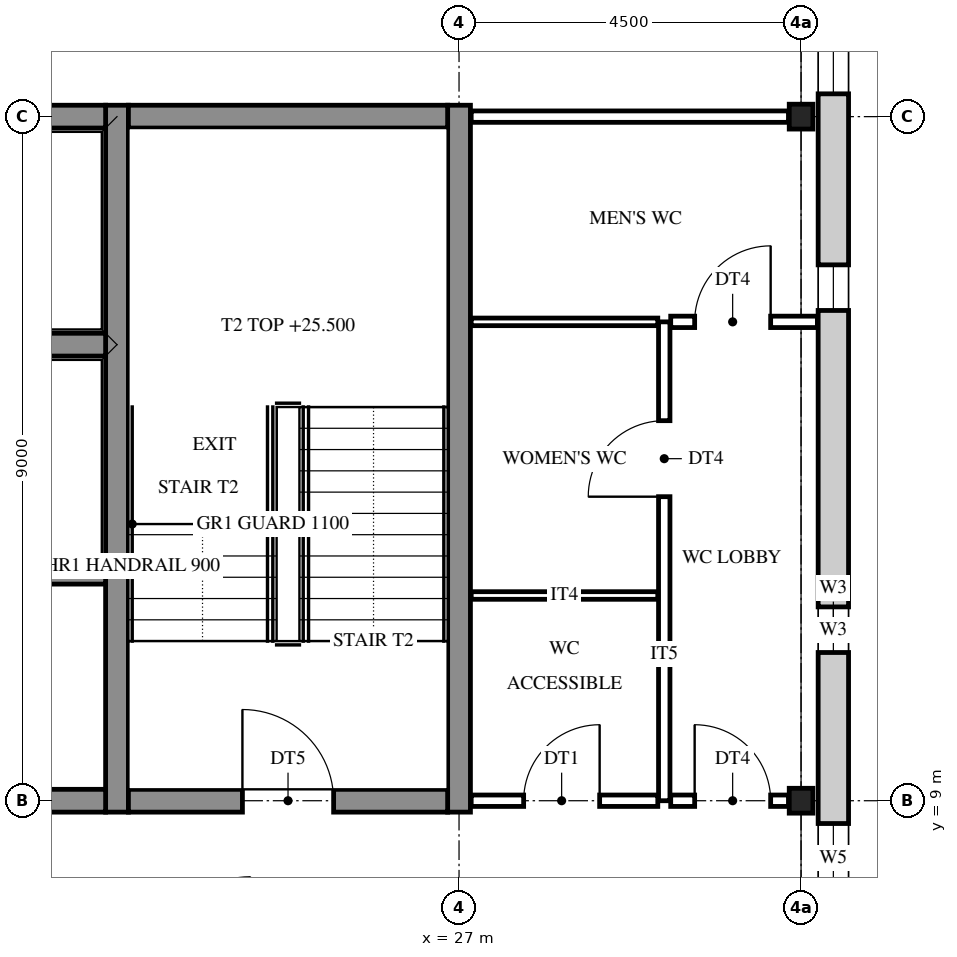
"""IFC4 building model, lengths in metres.
Left out: names, types, materials, properties, quantities, classifications, styles, units other than length and angle.
Written with IfcOpenShell. Run it as: python <this file> out.ifc"""

import sys

from ifc_helpers import new_model, si_unit, direction, frame, frame_2d, origin, origin_2d, place, context, subcontext, project, spatial, rectangle, i_section, extrude, element, fill, save


model = new_model("IFC4")
c1 = context("Model", 3, precision=1e-05, world=origin(), true_north=direction((0.0, 1.0)))
c2 = subcontext(c1, "Body", "Model", "MODEL_VIEW")
j1 = project(units=[si_unit("LENGTHUNIT", "METRE"), si_unit("PLANEANGLEUNIT", "RADIAN")], contexts=[c1])
p1 = place(None, origin())
s1 = spatial("IfcSite", under=j1, at=p1, CompositionType="ELEMENT")
p2 = place(p1, origin())
s2 = spatial("IfcBuilding", under=s1, at=p2, CompositionType="ELEMENT")
p3 = place(p2, frame((0.0, 0.0, 23.4)))
s3 = spatial("IfcBuildingStorey", under=s2, at=p3, CompositionType="ELEMENT", Elevation=23.4)
for number, where, z_axis, x_axis in (
    (1, (31.5, 9.0, 0.0), (0.0, 0.0, 1.0), (1.0, 0.0, 0.0)),
    (2, (31.5, 18.0, 0.0), (0.0, 0.0, 1.0), (1.0, 0.0, 0.0)),
):
    element("IfcColumn", number, at=place(p3, frame(where, z_axis=z_axis, x_axis=x_axis)), inside=s3, PredefinedType="COLUMN", context=c2, shape_type="SweptSolid", body=[
        extrude(i_section(OverallWidth=0.311, OverallDepth=0.327, WebThickness=0.016, FlangeThickness=0.025, FilletRadius=0.017, at=origin_2d()), origin(), (0.0, 0.0, 1.0), 4.2),
    ])
for number, where, z_axis, x_axis in (
    (3, (22.5, 8.85, 0.0), (0.0, 0.0, 1.0), (0.0, 1.0, 0.0)),
    (4, (27.0, 8.85, 0.0), (0.0, 0.0, 1.0), (0.0, 1.0, 0.0)),
):
    element("IfcWall", number, at=place(p3, frame(where, z_axis=z_axis, x_axis=x_axis)), inside=s3, PredefinedType="SHEAR", context=c2, shape_type="SweptSolid", body=[
        extrude(rectangle(XDim=9.3, YDim=0.3, at=frame_2d((4.65, 0.0))), origin(), (0.0, 0.0, 1.0), 4.2),
    ])
p4 = place(p3, frame((19.65, 9.0, 0.0), z_axis=(0.0, 0.0, 1.0), x_axis=(1.0, 0.0, 0.0)))
e5 = element("IfcWall", 5, at=p4, inside=s3, PredefinedType="SHEAR", context=c2, shape_type="SweptSolid", body=[
    extrude(rectangle(XDim=2.7, YDim=0.3, at=frame_2d((1.35, 0.0))), origin(), (0.0, 0.0, 1.0), 4.2),
])
p5 = place(p3, frame((22.65, 9.0, 0.0), z_axis=(0.0, 0.0, 1.0), x_axis=(1.0, 0.0, 0.0)))
e6 = element("IfcWall", 6, at=p5, inside=s3, PredefinedType="SHEAR", context=c2, shape_type="SweptSolid", body=[
    extrude(rectangle(XDim=4.2, YDim=0.3, at=frame_2d((2.1, 0.0))), origin(), (0.0, 0.0, 1.0), 4.2),
])
p6 = place(p5, frame((1.5, 0.0, 0.0)))
e7 = element("IfcOpeningElement", 7, at=p6, cuts=e6, PredefinedType="OPENING", context=c2, shape_type="SweptSolid", body=[
    extrude(rectangle(XDim=1.2, YDim=2.1, at=frame_2d((0.6, 1.05))), frame((0.0, 0.16, 0.0), z_axis=(0.0, -1.0, 0.0), x_axis=(1.0, 0.0, 0.0)), (0.0, 0.0, 1.0), 0.32),
])
for number, where, z_axis, x_axis in (
    (8, (19.65, 12.0, 0.0), (0.0, 0.0, 1.0), (1.0, 0.0, 0.0)),
    (9, (19.65, 15.0, 0.0), (0.0, 0.0, 1.0), (1.0, 0.0, 0.0)),
    (10, (19.65, 18.0, 0.0), (0.0, 0.0, 1.0), (1.0, 0.0, 0.0)),
):
    element("IfcWall", number, at=place(p3, frame(where, z_axis=z_axis, x_axis=x_axis)), inside=s3, PredefinedType="SHEAR", context=c2, shape_type="SweptSolid", body=[
        extrude(rectangle(XDim=2.7, YDim=0.3, at=frame_2d((1.35, 0.0))), origin(), (0.0, 0.0, 1.0), 4.2),
    ])
p7 = place(p3, frame((22.65, 18.0, 0.0), z_axis=(0.0, 0.0, 1.0), x_axis=(1.0, 0.0, 0.0)))
e11 = element("IfcWall", 11, at=p7, inside=s3, PredefinedType="SHEAR", context=c2, shape_type="SweptSolid", body=[
    extrude(rectangle(XDim=4.2, YDim=0.3, at=frame_2d((2.1, 0.0))), origin(), (0.0, 0.0, 1.0), 4.2),
])
p8 = place(p3, frame((31.925, 27.225, 0.0), z_axis=(0.0, 0.0, 1.0), x_axis=(0.0, -1.0, 0.0)))
e12 = element("IfcWall", 12, at=p8, inside=s3, PredefinedType="STANDARD", context=c2, shape_type="SweptSolid", body=[
    extrude(rectangle(XDim=27.45, YDim=0.4, at=frame_2d((13.725, 0.0))), origin(), (0.0, 0.0, 1.0), 4.2),
])
p9 = place(p8, frame((26.025, 0.0, 0.9)))
e13 = element("IfcOpeningElement", 13, at=p9, cuts=e12, PredefinedType="OPENING", context=c2, shape_type="SweptSolid", body=[
    extrude(rectangle(XDim=0.9, YDim=2.0, at=frame_2d((0.45, 1.0))), frame((0.0, 0.21, 0.0), z_axis=(0.0, -1.0, 0.0), x_axis=(1.0, 0.0, 0.0)), (0.0, 0.0, 1.0), 0.42),
])
p10 = place(p8, frame((18.525, 0.0, 0.9)))
e14 = element("IfcOpeningElement", 14, at=p10, cuts=e12, PredefinedType="OPENING", context=c2, shape_type="SweptSolid", body=[
    extrude(rectangle(XDim=0.9, YDim=2.0, at=frame_2d((0.45, 1.0))), frame((0.0, 0.21, 0.0), z_axis=(0.0, -1.0, 0.0), x_axis=(1.0, 0.0, 0.0)), (0.0, 0.0, 1.0), 0.42),
])
p11 = place(p8, frame((15.675, 0.0, 1.6)))
e15 = element("IfcOpeningElement", 15, at=p11, cuts=e12, PredefinedType="OPENING", context=c2, shape_type="SweptSolid", body=[
    extrude(rectangle(XDim=0.6, YDim=0.9, at=frame_2d((0.3, 0.45))), frame((0.0, 0.21, 0.0), z_axis=(0.0, -1.0, 0.0), x_axis=(1.0, 0.0, 0.0)), (0.0, 0.0, 1.0), 0.42),
])
p12 = place(p8, frame((11.175, 0.0, 1.6)))
e16 = element("IfcOpeningElement", 16, at=p12, cuts=e12, PredefinedType="OPENING", context=c2, shape_type="SweptSolid", body=[
    extrude(rectangle(XDim=0.6, YDim=0.9, at=frame_2d((0.3, 0.45))), frame((0.0, 0.21, 0.0), z_axis=(0.0, -1.0, 0.0), x_axis=(1.0, 0.0, 0.0)), (0.0, 0.0, 1.0), 0.42),
])
p13 = place(p8, frame((8.025, 0.0, 0.9)))
e17 = element("IfcOpeningElement", 17, at=p13, cuts=e12, PredefinedType="OPENING", context=c2, shape_type="SweptSolid", body=[
    extrude(rectangle(XDim=0.9, YDim=2.0, at=frame_2d((0.45, 1.0))), frame((0.0, 0.21, 0.0), z_axis=(0.0, -1.0, 0.0), x_axis=(1.0, 0.0, 0.0)), (0.0, 0.0, 1.0), 0.42),
])
p14 = place(p8, frame((0.525, 0.0, 0.9)))
e18 = element("IfcOpeningElement", 18, at=p14, cuts=e12, PredefinedType="OPENING", context=c2, shape_type="SweptSolid", body=[
    extrude(rectangle(XDim=0.9, YDim=2.0, at=frame_2d((0.45, 1.0))), frame((0.0, 0.21, 0.0), z_axis=(0.0, -1.0, 0.0), x_axis=(1.0, 0.0, 0.0)), (0.0, 0.0, 1.0), 0.42),
])
p15 = place(p3, frame((29.7, 9.0, 0.0), z_axis=(0.0, 0.0, 1.0), x_axis=(0.0, 1.0, 0.0)))
e19 = element("IfcWall", 19, at=p15, inside=s3, PredefinedType="PARTITIONING", context=c2, shape_type="SweptSolid", body=[
    extrude(rectangle(XDim=6.3, YDim=0.15, at=frame_2d((3.15, 0.0))), origin(), (0.0, 0.0, 1.0), 3.537),
])
p16 = place(p15, frame((4.0, 0.0, 0.0)))
e20 = element("IfcOpeningElement", 20, at=p16, cuts=e19, PredefinedType="OPENING", context=c2, shape_type="SweptSolid", body=[
    extrude(rectangle(XDim=1.0, YDim=2.1, at=frame_2d((0.5, 1.05))), frame((0.0, 0.085, 0.0), z_axis=(0.0, -1.0, 0.0), x_axis=(1.0, 0.0, 0.0)), (0.0, 0.0, 1.0), 0.17),
])
p17 = place(p3, frame((27.16, 9.0, 0.0), z_axis=(0.0, 0.0, 1.0), x_axis=(1.0, 0.0, 0.0)))
e21 = element("IfcWall", 21, at=p17, inside=s3, PredefinedType="PARTITIONING", context=c2, shape_type="SweptSolid", body=[
    extrude(rectangle(XDim=2.455, YDim=0.15, at=frame_2d((1.228, 0.0))), origin(), (0.0, 0.0, 1.0), 3.537),
])
p18 = place(p17, frame((0.69, 0.0, 0.0)))
e22 = element("IfcOpeningElement", 22, at=p18, cuts=e21, PredefinedType="OPENING", context=c2, shape_type="SweptSolid", body=[
    extrude(rectangle(XDim=1.0, YDim=2.1, at=frame_2d((0.5, 1.05))), frame((0.0, 0.085, 0.0), z_axis=(0.0, -1.0, 0.0), x_axis=(1.0, 0.0, 0.0)), (0.0, 0.0, 1.0), 0.17),
])
p19 = place(p3, frame((29.785, 9.0, 0.0), z_axis=(0.0, 0.0, 1.0), x_axis=(1.0, 0.0, 0.0)))
e23 = element("IfcWall", 23, at=p19, inside=s3, PredefinedType="PARTITIONING", context=c2, shape_type="SweptSolid", body=[
    extrude(rectangle(XDim=1.55, YDim=0.15, at=frame_2d((0.775, 0.0))), origin(), (0.0, 0.0, 1.0), 3.537),
])
p20 = place(p19, frame((0.315, 0.0, 0.0)))
e24 = element("IfcOpeningElement", 24, at=p20, cuts=e23, PredefinedType="OPENING", context=c2, shape_type="SweptSolid", body=[
    extrude(rectangle(XDim=1.0, YDim=2.1, at=frame_2d((0.5, 1.05))), frame((0.0, 0.085, 0.0), z_axis=(0.0, -1.0, 0.0), x_axis=(1.0, 0.0, 0.0)), (0.0, 0.0, 1.0), 0.17),
])
for number, where, z_axis, x_axis in (
    (25, (27.16, 11.7, 0.0), (0.0, 0.0, 1.0), (1.0, 0.0, 0.0)),
    (26, (27.16, 15.3, 0.0), (0.0, 0.0, 1.0), (1.0, 0.0, 0.0)),
):
    element("IfcWall", number, at=place(p3, frame(where, z_axis=z_axis, x_axis=x_axis)), inside=s3, PredefinedType="PARTITIONING", context=c2, shape_type="SweptSolid", body=[
        extrude(rectangle(XDim=2.455, YDim=0.1, at=frame_2d((1.228, 0.0))), origin(), (0.0, 0.0, 1.0), 3.537),
    ])
p21 = place(p3, frame((29.785, 15.3, 0.0), z_axis=(0.0, 0.0, 1.0), x_axis=(1.0, 0.0, 0.0)))
e27 = element("IfcWall", 27, at=p21, inside=s3, PredefinedType="PARTITIONING", context=c2, shape_type="SweptSolid", body=[
    extrude(rectangle(XDim=1.93, YDim=0.15, at=frame_2d((0.965, 0.0))), origin(), (0.0, 0.0, 1.0), 3.537),
])
p22 = place(p21, frame((0.315, 0.0, 0.0)))
e28 = element("IfcOpeningElement", 28, at=p22, cuts=e27, PredefinedType="OPENING", context=c2, shape_type="SweptSolid", body=[
    extrude(rectangle(XDim=1.0, YDim=2.1, at=frame_2d((0.5, 1.05))), frame((0.0, 0.085, 0.0), z_axis=(0.0, -1.0, 0.0), x_axis=(1.0, 0.0, 0.0)), (0.0, 0.0, 1.0), 0.17),
])
p23 = place(p3, frame((27.16, 18.0, 0.0), z_axis=(0.0, 0.0, 1.0), x_axis=(1.0, 0.0, 0.0)))
e29 = element("IfcWall", 29, at=p23, inside=s3, PredefinedType="PARTITIONING", context=c2, shape_type="SweptSolid", body=[
    extrude(rectangle(XDim=4.175, YDim=0.15, at=frame_2d((2.087, 0.0))), origin(), (0.0, 0.0, 1.0), 3.537),
])
p24 = place(p10, origin())
e30 = element("IfcWindow", 30, at=p24, inside=s3, PartitioningType="SINGLE_PANEL", PredefinedType="WINDOW", context=c2, shape_type="SweptSolid", body=[
    extrude(rectangle(XDim=0.9, YDim=2.0, at=frame_2d((0.45, 1.0))), frame((0.0, 0.03, 0.0), z_axis=(0.0, -1.0, 0.0), x_axis=(1.0, 0.0, 0.0)), (0.0, 0.0, 1.0), 0.06),
])
fill(e14, e30)
p25 = place(p11, origin())
e31 = element("IfcWindow", 31, at=p25, inside=s3, PartitioningType="SINGLE_PANEL", PredefinedType="WINDOW", context=c2, shape_type="SweptSolid", body=[
    extrude(rectangle(XDim=0.6, YDim=0.9, at=frame_2d((0.3, 0.45))), frame((0.0, 0.03, 0.0), z_axis=(0.0, -1.0, 0.0), x_axis=(1.0, 0.0, 0.0)), (0.0, 0.0, 1.0), 0.06),
])
fill(e15, e31)
p26 = place(p12, origin())
e32 = element("IfcWindow", 32, at=p26, inside=s3, PartitioningType="SINGLE_PANEL", PredefinedType="WINDOW", context=c2, shape_type="SweptSolid", body=[
    extrude(rectangle(XDim=0.6, YDim=0.9, at=frame_2d((0.3, 0.45))), frame((0.0, 0.03, 0.0), z_axis=(0.0, -1.0, 0.0), x_axis=(1.0, 0.0, 0.0)), (0.0, 0.0, 1.0), 0.06),
])
fill(e16, e32)
p27 = place(p13, origin())
e33 = element("IfcWindow", 33, at=p27, inside=s3, PartitioningType="SINGLE_PANEL", PredefinedType="WINDOW", context=c2, shape_type="SweptSolid", body=[
    extrude(rectangle(XDim=0.9, YDim=2.0, at=frame_2d((0.45, 1.0))), frame((0.0, 0.03, 0.0), z_axis=(0.0, -1.0, 0.0), x_axis=(1.0, 0.0, 0.0)), (0.0, 0.0, 1.0), 0.06),
])
fill(e17, e33)
p28 = place(p6, origin())
e34 = element("IfcDoor", 34, at=p28, inside=s3, OperationType="SINGLE_SWING_LEFT", PredefinedType="DOOR", context=c2, shape_type="SweptSolid", body=[
    extrude(rectangle(XDim=1.2, YDim=2.1, at=frame_2d((0.6, 1.05))), frame((0.0, 0.025, 0.0), z_axis=(0.0, -1.0, 0.0), x_axis=(1.0, 0.0, 0.0)), (0.0, 0.0, 1.0), 0.05),
])
fill(e7, e34)
p29 = place(p18, origin())
e35 = element("IfcDoor", 35, at=p29, inside=s3, OperationType="SINGLE_SWING_RIGHT", PredefinedType="DOOR", context=c2, shape_type="SweptSolid", body=[
    extrude(rectangle(XDim=1.0, YDim=2.1, at=frame_2d((0.5, 1.05))), frame((0.0, 0.025, 0.0), z_axis=(0.0, -1.0, 0.0), x_axis=(1.0, 0.0, 0.0)), (0.0, 0.0, 1.0), 0.05),
])
fill(e22, e35)
p30 = place(p16, origin())
e36 = element("IfcDoor", 36, at=p30, inside=s3, OperationType="SINGLE_SWING_LEFT", PredefinedType="DOOR", context=c2, shape_type="SweptSolid", body=[
    extrude(rectangle(XDim=1.0, YDim=2.1, at=frame_2d((0.5, 1.05))), frame((0.0, 0.025, 0.0), z_axis=(0.0, -1.0, 0.0), x_axis=(1.0, 0.0, 0.0)), (0.0, 0.0, 1.0), 0.05),
])
fill(e20, e36)
p31 = place(p22, origin())
e37 = element("IfcDoor", 37, at=p31, inside=s3, OperationType="SINGLE_SWING_RIGHT", PredefinedType="DOOR", context=c2, shape_type="SweptSolid", body=[
    extrude(rectangle(XDim=1.0, YDim=2.1, at=frame_2d((0.5, 1.05))), frame((0.0, 0.025, 0.0), z_axis=(0.0, -1.0, 0.0), x_axis=(1.0, 0.0, 0.0)), (0.0, 0.0, 1.0), 0.05),
])
fill(e28, e37)
p32 = place(p20, origin())
e38 = element("IfcDoor", 38, at=p32, inside=s3, OperationType="SINGLE_SWING_LEFT", PredefinedType="DOOR", context=c2, shape_type="SweptSolid", body=[
    extrude(rectangle(XDim=1.0, YDim=2.1, at=frame_2d((0.5, 1.05))), frame((0.0, 0.025, 0.0), z_axis=(0.0, -1.0, 0.0), x_axis=(1.0, 0.0, 0.0)), (0.0, 0.0, 1.0), 0.05),
])
fill(e24, e38)
save(model, sys.argv[1])
